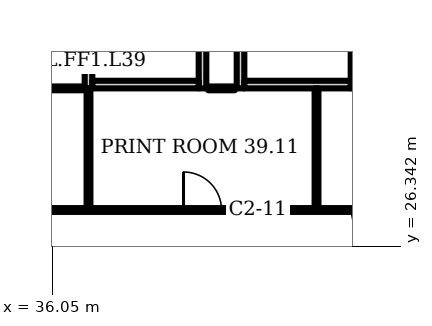
"""IFC4 building model, lengths in metres.
Left out: names, types, materials, properties, quantities, classifications, styles, units other than length and angle.
Written with IfcOpenShell. Run it as: python <this file> out.ifc"""

import sys

from ifc_helpers import new_model, si_unit, direction, frame, frame_2d, origin, place, context, subcontext, project, spatial, rectangle, extrude, element, fill, save


model = new_model("IFC4")
c1 = context("Model", 3, precision=1e-05, world=origin(), true_north=direction((0.0, 1.0)))
c2 = subcontext(c1, "Body", "Model", "MODEL_VIEW")
j1 = project(units=[si_unit("LENGTHUNIT", "METRE"), si_unit("PLANEANGLEUNIT", "RADIAN")], contexts=[c1])
p1 = place(None, origin())
s1 = spatial("IfcSite", under=j1, at=p1, CompositionType="ELEMENT")
p2 = place(p1, origin())
s2 = spatial("IfcBuilding", under=s1, at=p2, CompositionType="ELEMENT")
p3 = place(p2, frame((0.0, 0.0, 162.7)))
s3 = spatial("IfcBuildingStorey", under=s2, at=p3, CompositionType="ELEMENT", Elevation=162.7)
p4 = place(p3, frame((37.0, 30.5, 0.0), z_axis=(0.0, 0.0, 1.0), x_axis=(0.0, 1.0, 0.0)))
e1 = element("IfcWall", 1, at=p4, inside=s3, PredefinedType="PARTITIONING", context=c2, shape_type="SweptSolid", body=[
    extrude(rectangle(XDim=3.5, YDim=0.2, at=frame_2d((1.75, 0.0))), origin(), (0.0, 0.0, 1.0), 3.2),
])
p5 = place(p4, frame((1.2, 0.0, 0.0)))
e2 = element("IfcOpeningElement", 2, at=p5, cuts=e1, PredefinedType="OPENING", context=c2, shape_type="SweptSolid", body=[
    extrude(rectangle(XDim=1.1, YDim=2.1, at=frame_2d((0.55, 1.05))), frame((0.0, 0.11, 0.0), z_axis=(0.0, -1.0, 0.0), x_axis=(1.0, 0.0, 0.0)), (0.0, 0.0, 1.0), 0.22),
])
p6 = place(p3, frame((40.0, 30.5, 0.0), z_axis=(0.0, 0.0, 1.0), x_axis=(0.0, 1.0, 0.0)))
e3 = element("IfcWall", 3, at=p6, inside=s3, PredefinedType="PARTITIONING", context=c2, shape_type="SweptSolid", body=[
    extrude(rectangle(XDim=3.5, YDim=0.2, at=frame_2d((1.75, 0.0))), origin(), (0.0, 0.0, 1.0), 3.2),
])
p7 = place(p3, frame((37.1, 30.6, 0.0), z_axis=(0.0, 0.0, 1.0), x_axis=(1.0, 0.0, 0.0)))
e4 = element("IfcWall", 4, at=p7, inside=s3, PredefinedType="PARTITIONING", context=c2, shape_type="SweptSolid", body=[
    extrude(rectangle(XDim=2.8, YDim=0.2, at=frame_2d((1.4, 0.0))), origin(), (0.0, 0.0, 1.0), 3.2),
])
p8 = place(p3, frame((41.0, 30.5, 0.0), z_axis=(0.0, 0.0, 1.0), x_axis=(0.0, 1.0, 0.0)))
e5 = element("IfcWall", 5, at=p8, inside=s3, PredefinedType="PARTITIONING", context=c2, shape_type="SweptSolid", body=[
    extrude(rectangle(XDim=3.5, YDim=0.2, at=frame_2d((1.75, 0.0))), origin(), (0.0, 0.0, 1.0), 3.2),
])
p9 = place(p3, frame((44.0, 30.5, 0.0), z_axis=(0.0, 0.0, 1.0), x_axis=(0.0, 1.0, 0.0)))
e6 = element("IfcWall", 6, at=p9, inside=s3, PredefinedType="PARTITIONING", context=c2, shape_type="SweptSolid", body=[
    extrude(rectangle(XDim=3.5, YDim=0.2, at=frame_2d((1.75, 0.0))), origin(), (0.0, 0.0, 1.0), 3.2),
])
p10 = place(p9, frame((1.2, 0.0, 0.0)))
e7 = element("IfcOpeningElement", 7, at=p10, cuts=e6, PredefinedType="OPENING", context=c2, shape_type="SweptSolid", body=[
    extrude(rectangle(XDim=1.1, YDim=2.1, at=frame_2d((0.55, 1.05))), frame((0.0, 0.11, 0.0), z_axis=(0.0, -1.0, 0.0), x_axis=(1.0, 0.0, 0.0)), (0.0, 0.0, 1.0), 0.22),
])
p11 = place(p3, frame((41.1, 30.6, 0.0), z_axis=(0.0, 0.0, 1.0), x_axis=(1.0, 0.0, 0.0)))
e8 = element("IfcWall", 8, at=p11, inside=s3, PredefinedType="PARTITIONING", context=c2, shape_type="SweptSolid", body=[
    extrude(rectangle(XDim=2.8, YDim=0.2, at=frame_2d((1.4, 0.0))), origin(), (0.0, 0.0, 1.0), 3.2),
])
p12 = place(p3, frame((16.0, 30.5, 0.0), z_axis=(0.0, 0.0, 1.0), x_axis=(1.0, 0.0, 0.0)))
e9 = element("IfcWall", 9, at=p12, inside=s3, PredefinedType="PARTITIONING", context=c2, shape_type="SweptSolid", body=[
    extrude(rectangle(XDim=20.85, YDim=0.1, at=frame_2d((10.425, 0.0))), origin(), (0.0, 0.0, 1.0), 3.2),
])
p13 = place(p12, frame((14.42, 0.0, 0.0)))
e10 = element("IfcOpeningElement", 10, at=p13, cuts=e9, PredefinedType="OPENING", context=c2, shape_type="SweptSolid", body=[
    extrude(rectangle(XDim=1.0, YDim=2.1, at=frame_2d((0.5, 1.05))), frame((0.0, 0.06, 0.0), z_axis=(0.0, -1.0, 0.0), x_axis=(1.0, 0.0, 0.0)), (0.0, 0.0, 1.0), 0.12),
])
p14 = place(p3, frame((23.2, 27.3, 0.0), z_axis=(0.0, 0.0, 1.0), x_axis=(1.0, 0.0, 0.0)))
e11 = element("IfcWall", 11, at=p14, inside=s3, PredefinedType="PARTITIONING", context=c2, shape_type="SweptSolid", body=[
    extrude(rectangle(XDim=33.9, YDim=0.1, at=frame_2d((16.95, 0.0))), origin(), (0.0, 0.0, 1.0), 3.2),
])
p15 = place(p14, frame((16.3, 0.0, 0.0)))
e12 = element("IfcOpeningElement", 12, at=p15, cuts=e11, PredefinedType="OPENING", context=c2, shape_type="SweptSolid", body=[
    extrude(rectangle(XDim=1.0, YDim=2.1, at=frame_2d((0.5, 1.05))), frame((0.0, 0.06, 0.0), z_axis=(0.0, -1.0, 0.0), x_axis=(1.0, 0.0, 0.0)), (0.0, 0.0, 1.0), 0.12),
])
p16 = place(p14, frame((20.72, 0.0, 0.0)))
e13 = element("IfcOpeningElement", 13, at=p16, cuts=e11, PredefinedType="OPENING", context=c2, shape_type="SweptSolid", body=[
    extrude(rectangle(XDim=1.0, YDim=2.1, at=frame_2d((0.5, 1.05))), frame((0.0, 0.06, 0.0), z_axis=(0.0, -1.0, 0.0), x_axis=(1.0, 0.0, 0.0)), (0.0, 0.0, 1.0), 0.12),
])
p17 = place(p14, frame((23.54, 0.0, 0.0)))
e14 = element("IfcOpeningElement", 14, at=p17, cuts=e11, PredefinedType="OPENING", context=c2, shape_type="SweptSolid", body=[
    extrude(rectangle(XDim=1.0, YDim=2.1, at=frame_2d((0.5, 1.05))), frame((0.0, 0.06, 0.0), z_axis=(0.0, -1.0, 0.0), x_axis=(1.0, 0.0, 0.0)), (0.0, 0.0, 1.0), 0.12),
])
p18 = place(p14, frame((26.36, 0.0, 0.0)))
e15 = element("IfcOpeningElement", 15, at=p18, cuts=e11, PredefinedType="OPENING", context=c2, shape_type="SweptSolid", body=[
    extrude(rectangle(XDim=1.0, YDim=2.1, at=frame_2d((0.5, 1.05))), frame((0.0, 0.06, 0.0), z_axis=(0.0, -1.0, 0.0), x_axis=(1.0, 0.0, 0.0)), (0.0, 0.0, 1.0), 0.12),
])
p19 = place(p14, frame((29.18, 0.0, 0.0)))
e16 = element("IfcOpeningElement", 16, at=p19, cuts=e11, PredefinedType="OPENING", context=c2, shape_type="SweptSolid", body=[
    extrude(rectangle(XDim=1.0, YDim=2.1, at=frame_2d((0.5, 1.05))), frame((0.0, 0.06, 0.0), z_axis=(0.0, -1.0, 0.0), x_axis=(1.0, 0.0, 0.0)), (0.0, 0.0, 1.0), 0.12),
])
p20 = place(p14, frame((32.0, 0.0, 0.0)))
e17 = element("IfcOpeningElement", 17, at=p20, cuts=e11, PredefinedType="OPENING", context=c2, shape_type="SweptSolid", body=[
    extrude(rectangle(XDim=1.0, YDim=2.1, at=frame_2d((0.5, 1.05))), frame((0.0, 0.06, 0.0), z_axis=(0.0, -1.0, 0.0), x_axis=(1.0, 0.0, 0.0)), (0.0, 0.0, 1.0), 0.12),
])
for number, where, z_axis, x_axis in (
    (18, (37.0, 27.3, 0.0), (0.0, 0.0, 1.0), (0.0, 1.0, 0.0)),
    (19, (43.0, 27.3, 0.0), (0.0, 0.0, 1.0), (0.0, 1.0, 0.0)),
):
    element("IfcWall", number, at=place(p3, frame(where, z_axis=z_axis, x_axis=x_axis)), inside=s3, PredefinedType="PARTITIONING", context=c2, shape_type="SweptSolid", body=[
        extrude(rectangle(XDim=3.2, YDim=0.1, at=frame_2d((1.6, 0.0))), origin(), (0.0, 0.0, 1.0), 3.2),
    ])
p21 = place(p3, frame((40.15, 30.5, 0.0), z_axis=(0.0, 0.0, 1.0), x_axis=(1.0, 0.0, 0.0)))
e20 = element("IfcWall", 20, at=p21, inside=s3, PredefinedType="PARTITIONING", context=c2, shape_type="SweptSolid", body=[
    extrude(rectangle(XDim=0.7, YDim=0.1, at=frame_2d((0.35, 0.0))), origin(), (0.0, 0.0, 1.0), 3.2),
])
p22 = place(p15, origin())
e21 = element("IfcDoor", 21, at=p22, inside=s3, OperationType="SINGLE_SWING_LEFT", PredefinedType="DOOR", context=c2, shape_type="SweptSolid", body=[
    extrude(rectangle(XDim=1.0, YDim=2.1, at=frame_2d((0.5, 1.05))), frame((0.0, 0.025, 0.0), z_axis=(0.0, -1.0, 0.0), x_axis=(1.0, 0.0, 0.0)), (0.0, 0.0, 1.0), 0.05),
])
fill(e12, e21)
p23 = place(p16, origin())
e22 = element("IfcDoor", 22, at=p23, inside=s3, OperationType="SINGLE_SWING_RIGHT", PredefinedType="DOOR", context=c2, shape_type="SweptSolid", body=[
    extrude(rectangle(XDim=1.0, YDim=2.1, at=frame_2d((0.5, 1.05))), frame((0.0, 0.025, 0.0), z_axis=(0.0, -1.0, 0.0), x_axis=(1.0, 0.0, 0.0)), (0.0, 0.0, 1.0), 0.05),
])
fill(e13, e22)
save(model, sys.argv[1])
